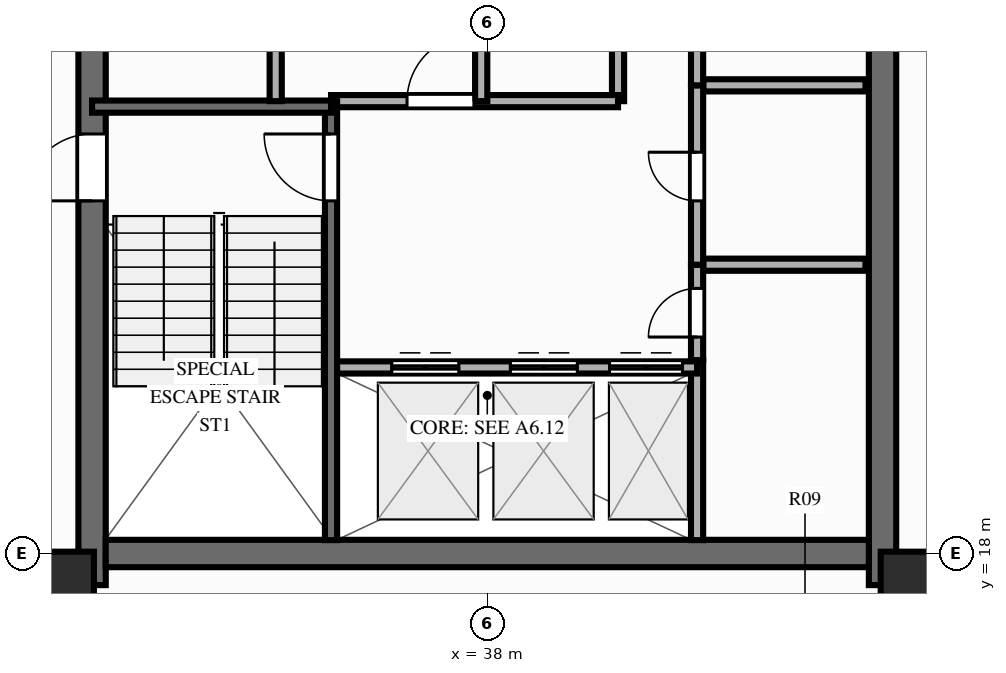
"""IFC4 building model, lengths in metres.
Left out: names, types, materials, properties, quantities, classifications, styles, units other than length and angle.
Written with IfcOpenShell. Run it as: python <this file> out.ifc"""

import sys

from ifc_helpers import new_model, si_unit, direction, frame, frame_2d, origin, origin_2d, place, context, subcontext, project, spatial, rectangle, extrude, source, transform, mapped, element, fill, save


model = new_model("IFC4")
c1 = context("Model", 3, precision=1e-05, world=origin(), true_north=direction((0.0, 1.0)))
c2 = subcontext(c1, "Body", "Model", "MODEL_VIEW")
j1 = project(units=[si_unit("LENGTHUNIT", "METRE"), si_unit("PLANEANGLEUNIT", "RADIAN")], contexts=[c1])
p1 = place(None, origin())
s1 = spatial("IfcSite", under=j1, at=p1, CompositionType="ELEMENT")
p2 = place(p1, origin())
s2 = spatial("IfcBuilding", under=s1, at=p2, CompositionType="ELEMENT")
p3 = place(p2, frame((0.0, 0.0, 172.9)))
s3 = spatial("IfcBuildingStorey", under=s2, at=p3, CompositionType="ELEMENT", Elevation=172.9)
p4 = place(p3, frame((31.5, 17.48, 0.0), z_axis=(0.0, 0.0, 1.0), x_axis=(0.0, 1.0, 0.0)))
e1 = element("IfcWall", 1, at=p4, inside=s3, PredefinedType="SHEAR", context=c2, shape_type="SweptSolid", body=[
    extrude(rectangle(XDim=19.04, YDim=0.45, at=frame_2d((9.52, 0.0))), origin(), (0.0, 0.0, 1.0), 3.9),
])
p5 = place(p4, frame((6.32, 0.0, 0.0)))
e2 = element("IfcOpeningElement", 2, at=p5, cuts=e1, PredefinedType="OPENING", context=c2, shape_type="SweptSolid", body=[
    extrude(rectangle(XDim=1.1, YDim=2.15, at=frame_2d((0.55, 1.075))), frame((0.0, 0.237, 0.0), z_axis=(0.0, -1.0, 0.0), x_axis=(1.0, 0.0, 0.0)), (0.0, 0.0, 1.0), 0.474),
])
p6 = place(p3, frame((44.5, 17.48, 0.0), z_axis=(0.0, 0.0, 1.0), x_axis=(0.0, 1.0, 0.0)))
e3 = element("IfcWall", 3, at=p6, inside=s3, PredefinedType="SHEAR", context=c2, shape_type="SweptSolid", body=[
    extrude(rectangle(XDim=19.04, YDim=0.45, at=frame_2d((9.52, 0.0))), origin(), (0.0, 0.0, 1.0), 3.9),
])
p7 = place(p6, frame((12.67, 0.0, 0.0), z_axis=(0.0, 0.0, 1.0), x_axis=(-1.0, 0.0, 0.0)))
e4 = element("IfcOpeningElement", 4, at=p7, cuts=e3, PredefinedType="OPENING", context=c2, shape_type="SweptSolid", body=[
    extrude(rectangle(XDim=1.1, YDim=2.15, at=frame_2d((0.55, 1.075))), frame((0.0, 0.237, 0.0), z_axis=(0.0, -1.0, 0.0), x_axis=(1.0, 0.0, 0.0)), (0.0, 0.0, 1.0), 0.474),
])
p8 = place(p3, frame((31.725, 18.0, 0.0), z_axis=(0.0, 0.0, 1.0), x_axis=(1.0, 0.0, 0.0)))
e5 = element("IfcWall", 5, at=p8, inside=s3, PredefinedType="SHEAR", context=c2, shape_type="SweptSolid", body=[
    extrude(rectangle(XDim=12.55, YDim=0.45, at=frame_2d((6.275, 0.0))), origin(), (0.0, 0.0, 1.0), 3.9),
])
m1 = source(origin(), c2, "Body", "SweptSolid", [
    extrude(rectangle(XDim=1.1, YDim=1.1, at=origin_2d()), origin(), (0.0, 0.0, 1.0), 3.9),
])
for number, where, z_axis, x_axis in (
    (6, (30.98, 17.48, 0.0), (0.0, 0.0, 1.0), (1.0, 0.0, 0.0)),
    (7, (45.02, 17.48, 0.0), (0.0, 0.0, 1.0), (1.0, 0.0, 0.0)),
):
    element("IfcColumn", number, at=place(p3, frame(where, z_axis=z_axis, x_axis=x_axis)), inside=s3, PredefinedType="COLUMN", context=c2, shape_type="MappedRepresentation", body=[
        mapped(m1, transform((0.0, 0.0, 0.0), scale=1.0)),
    ])
p9 = place(p3, frame((41.55, 22.75, 0.0), z_axis=(0.0, 0.0, 1.0), x_axis=(1.0, 0.0, 0.0)))
e8 = element("IfcWall", 8, at=p9, inside=s3, PredefinedType="PARTITIONING", context=c2, shape_type="SweptSolid", body=[
    extrude(rectangle(XDim=2.67, YDim=0.2, at=frame_2d((1.335, 0.0))), origin(), (0.0, 0.0, 1.0), 3.69),
])
p10 = place(p3, frame((41.55, 25.7, 0.0), z_axis=(0.0, 0.0, 1.0), x_axis=(1.0, 0.0, 0.0)))
e9 = element("IfcWall", 9, at=p10, inside=s3, PredefinedType="PARTITIONING", context=c2, shape_type="SweptSolid", body=[
    extrude(rectangle(XDim=2.67, YDim=0.2, at=frame_2d((1.335, 0.0))), origin(), (0.0, 0.0, 1.0), 3.04),
])
p11 = place(p3, frame((41.45, 18.22, 0.0), z_axis=(0.0, 0.0, 1.0), x_axis=(0.0, 1.0, 0.0)))
e10 = element("IfcWall", 10, at=p11, inside=s3, PredefinedType="PARTITIONING", context=c2, shape_type="SweptSolid", body=[
    extrude(rectangle(XDim=2.96, YDim=0.2, at=frame_2d((1.48, 0.0))), origin(), (0.0, 0.0, 1.0), 3.69),
])
p12 = place(p3, frame((41.45, 21.18, 0.0), z_axis=(0.0, 0.0, 1.0), x_axis=(0.0, 1.0, 0.0)))
e11 = element("IfcWall", 11, at=p12, inside=s3, PredefinedType="PARTITIONING", context=c2, shape_type="SweptSolid", body=[
    extrude(rectangle(XDim=1.57, YDim=0.2, at=frame_2d((0.785, 0.0))), origin(), (0.0, 0.0, 1.0), 3.69),
])
p13 = place(p12, frame((0.38, 0.0, 0.0)))
e12 = element("IfcOpeningElement", 12, at=p13, cuts=e11, PredefinedType="OPENING", context=c2, shape_type="SweptSolid", body=[
    extrude(rectangle(XDim=0.8, YDim=2.05, at=frame_2d((0.4, 1.025))), frame((0.0, 0.112, 0.0), z_axis=(0.0, -1.0, 0.0), x_axis=(1.0, 0.0, 0.0)), (0.0, 0.0, 1.0), 0.224),
])
p14 = place(p3, frame((41.45, 22.75, 0.0), z_axis=(0.0, 0.0, 1.0), x_axis=(0.0, 1.0, 0.0)))
e13 = element("IfcWall", 13, at=p14, inside=s3, PredefinedType="PARTITIONING", context=c2, shape_type="SweptSolid", body=[
    extrude(rectangle(XDim=2.95, YDim=0.2, at=frame_2d((1.475, 0.0))), origin(), (0.0, 0.0, 1.0), 3.69),
])
p15 = place(p14, frame((1.05, 0.0, 0.0)))
e14 = element("IfcOpeningElement", 14, at=p15, cuts=e13, PredefinedType="OPENING", context=c2, shape_type="SweptSolid", body=[
    extrude(rectangle(XDim=0.8, YDim=2.05, at=frame_2d((0.4, 1.025))), frame((0.0, 0.112, 0.0), z_axis=(0.0, -1.0, 0.0), x_axis=(1.0, 0.0, 0.0)), (0.0, 0.0, 1.0), 0.224),
])
p16 = place(p3, frame((41.45, 25.7, 0.0), z_axis=(0.0, 0.0, 1.0), x_axis=(0.0, 1.0, 0.0)))
e15 = element("IfcWall", 15, at=p16, inside=s3, PredefinedType="PARTITIONING", context=c2, shape_type="SweptSolid", body=[
    extrude(rectangle(XDim=2.9, YDim=0.2, at=frame_2d((1.45, 0.0))), origin(), (0.0, 0.0, 1.0), 3.69),
])
p17 = place(p16, frame((1.0, 0.0, 0.0)))
e16 = element("IfcOpeningElement", 16, at=p17, cuts=e15, PredefinedType="OPENING", context=c2, shape_type="SweptSolid", body=[
    extrude(rectangle(XDim=0.9, YDim=2.1, at=frame_2d((0.45, 1.05))), frame((0.0, 0.112, 0.0), z_axis=(0.0, -1.0, 0.0), x_axis=(1.0, 0.0, 0.0)), (0.0, 0.0, 1.0), 0.224),
])
p18 = place(p3, frame((40.15, 25.44, 0.0), z_axis=(0.0, 0.0, 1.0), x_axis=(0.0, 1.0, 0.0)))
e17 = element("IfcWall", 17, at=p18, inside=s3, PredefinedType="PARTITIONING", context=c2, shape_type="SweptSolid", body=[
    extrude(rectangle(XDim=6.36, YDim=0.2, at=frame_2d((3.18, 0.0))), origin(), (0.0, 0.0, 1.0), 3.69),
])
p19 = place(p3, frame((35.43, 21.06, 0.0), z_axis=(0.0, 0.0, 1.0), x_axis=(1.0, 0.0, 0.0)))
e18 = element("IfcWall", 18, at=p19, inside=s3, PredefinedType="PARTITIONING", context=c2, shape_type="SweptSolid", body=[
    extrude(rectangle(XDim=6.02, YDim=0.2, at=frame_2d((3.01, 0.0))), origin(), (0.0, 0.0, 1.0), 3.69),
])
p20 = place(p19, frame((1.0, 0.0, 0.0)))
e19 = element("IfcOpeningElement", 19, at=p20, cuts=e18, PredefinedType="OPENING", context=c2, shape_type="SweptSolid", body=[
    extrude(rectangle(XDim=1.1, YDim=2.15, at=frame_2d((0.55, 1.075))), frame((0.0, 0.112, 0.0), z_axis=(0.0, -1.0, 0.0), x_axis=(1.0, 0.0, 0.0)), (0.0, 0.0, 1.0), 0.224),
])
p21 = place(p19, frame((2.95, 0.0, 0.0)))
e20 = element("IfcOpeningElement", 20, at=p21, cuts=e18, PredefinedType="OPENING", context=c2, shape_type="SweptSolid", body=[
    extrude(rectangle(XDim=1.1, YDim=2.15, at=frame_2d((0.55, 1.075))), frame((0.0, 0.112, 0.0), z_axis=(0.0, -1.0, 0.0), x_axis=(1.0, 0.0, 0.0)), (0.0, 0.0, 1.0), 0.224),
])
p22 = place(p19, frame((4.58, 0.0, 0.0)))
e21 = element("IfcOpeningElement", 21, at=p22, cuts=e18, PredefinedType="OPENING", context=c2, shape_type="SweptSolid", body=[
    extrude(rectangle(XDim=1.2, YDim=2.15, at=frame_2d((0.6, 1.075))), frame((0.0, 0.112, 0.0), z_axis=(0.0, -1.0, 0.0), x_axis=(1.0, 0.0, 0.0)), (0.0, 0.0, 1.0), 0.224),
])
p23 = place(p3, frame((35.43, 25.44, 0.0), z_axis=(0.0, 0.0, 1.0), x_axis=(1.0, 0.0, 0.0)))
e22 = element("IfcWall", 22, at=p23, inside=s3, PredefinedType="PARTITIONING", context=c2, shape_type="SweptSolid", body=[
    extrude(rectangle(XDim=4.72, YDim=0.2, at=frame_2d((2.36, 0.0))), origin(), (0.0, 0.0, 1.0), 3.69),
])
p24 = place(p23, frame((1.25, 0.0, 0.0)))
e23 = element("IfcOpeningElement", 23, at=p24, cuts=e22, PredefinedType="OPENING", context=c2, shape_type="SweptSolid", body=[
    extrude(rectangle(XDim=1.1, YDim=2.15, at=frame_2d((0.55, 1.075))), frame((0.0, 0.112, 0.0), z_axis=(0.0, -1.0, 0.0), x_axis=(1.0, 0.0, 0.0)), (0.0, 0.0, 1.0), 0.224),
])
p25 = place(p3, frame((35.43, 18.22, 0.0), z_axis=(0.0, 0.0, 1.0), x_axis=(0.0, 1.0, 0.0)))
e24 = element("IfcWall", 24, at=p25, inside=s3, PredefinedType="SOLIDWALL", context=c2, shape_type="SweptSolid", body=[
    extrude(rectangle(XDim=7.22, YDim=0.2, at=frame_2d((3.61, 0.0))), origin(), (0.0, 0.0, 1.0), 3.69),
])
p26 = place(p25, frame((6.68, 0.0, 0.0), z_axis=(0.0, 0.0, 1.0), x_axis=(-1.0, 0.0, 0.0)))
e25 = element("IfcOpeningElement", 25, at=p26, cuts=e24, PredefinedType="OPENING", context=c2, shape_type="SweptSolid", body=[
    extrude(rectangle(XDim=1.1, YDim=2.15, at=frame_2d((0.55, 1.075))), frame((0.0, 0.112, 0.0), z_axis=(0.0, -1.0, 0.0), x_axis=(1.0, 0.0, 0.0)), (0.0, 0.0, 1.0), 0.224),
])
p27 = place(p3, frame((31.5, 25.35, 0.0), z_axis=(0.0, 0.0, 1.0), x_axis=(1.0, 0.0, 0.0)))
e26 = element("IfcWall", 26, at=p27, inside=s3, PredefinedType="SOLIDWALL", context=c2, shape_type="SweptSolid", body=[
    extrude(rectangle(XDim=3.93, YDim=0.2, at=frame_2d((1.965, 0.0))), origin(), (0.0, 0.0, 1.0), 3.69),
])
p28 = place(p3, frame((34.52, 25.44, 0.0), z_axis=(0.0, 0.0, 1.0), x_axis=(0.0, 1.0, 0.0)))
e27 = element("IfcWall", 27, at=p28, inside=s3, PredefinedType="PARTITIONING", context=c2, shape_type="SweptSolid", body=[
    extrude(rectangle(XDim=10.34, YDim=0.2, at=frame_2d((5.17, 0.0))), origin(), (0.0, 0.0, 1.0), 3.69),
])
p29 = place(p28, frame((1.15, 0.0, 0.0)))
e28 = element("IfcOpeningElement", 28, at=p29, cuts=e27, PredefinedType="OPENING", context=c2, shape_type="SweptSolid", body=[
    extrude(rectangle(XDim=0.9, YDim=2.1, at=frame_2d((0.45, 1.05))), frame((0.0, 0.112, 0.0), z_axis=(0.0, -1.0, 0.0), x_axis=(1.0, 0.0, 0.0)), (0.0, 0.0, 1.0), 0.224),
])
p30 = place(p28, frame((4.35, 0.0, 0.0)))
e29 = element("IfcOpeningElement", 29, at=p30, cuts=e27, PredefinedType="OPENING", context=c2, shape_type="SweptSolid", body=[
    extrude(rectangle(XDim=0.9, YDim=2.1, at=frame_2d((0.45, 1.05))), frame((0.0, 0.112, 0.0), z_axis=(0.0, -1.0, 0.0), x_axis=(1.0, 0.0, 0.0)), (0.0, 0.0, 1.0), 0.224),
])
p31 = place(p28, frame((7.01, 0.0, 0.0)))
e30 = element("IfcOpeningElement", 30, at=p31, cuts=e27, PredefinedType="OPENING", context=c2, shape_type="SweptSolid", body=[
    extrude(rectangle(XDim=1.0, YDim=2.15, at=frame_2d((0.5, 1.075))), frame((0.0, 0.112, 0.0), z_axis=(0.0, -1.0, 0.0), x_axis=(1.0, 0.0, 0.0)), (0.0, 0.0, 1.0), 0.224),
])
p32 = place(p28, frame((8.76, 0.0, 0.0)))
e31 = element("IfcOpeningElement", 31, at=p32, cuts=e27, PredefinedType="OPENING", context=c2, shape_type="SweptSolid", body=[
    extrude(rectangle(XDim=1.0, YDim=2.15, at=frame_2d((0.5, 1.075))), frame((0.0, 0.112, 0.0), z_axis=(0.0, -1.0, 0.0), x_axis=(1.0, 0.0, 0.0)), (0.0, 0.0, 1.0), 0.224),
])
p33 = place(p3, frame((37.9, 25.44, 0.0), z_axis=(0.0, 0.0, 1.0), x_axis=(0.0, 1.0, 0.0)))
e32 = element("IfcWall", 32, at=p33, inside=s3, PredefinedType="PARTITIONING", context=c2, shape_type="SweptSolid", body=[
    extrude(rectangle(XDim=10.34, YDim=0.2, at=frame_2d((5.17, 0.0))), origin(), (0.0, 0.0, 1.0), 3.69),
])
p34 = place(p33, frame((2.6, 0.0, 0.0)))
e33 = element("IfcOpeningElement", 33, at=p34, cuts=e32, PredefinedType="OPENING", context=c2, shape_type="SweptSolid", body=[
    extrude(rectangle(XDim=1.0, YDim=2.15, at=frame_2d((0.5, 1.075))), frame((0.0, 0.112, 0.0), z_axis=(0.0, -1.0, 0.0), x_axis=(1.0, 0.0, 0.0)), (0.0, 0.0, 1.0), 0.224),
])
p35 = place(p33, frame((6.86, 0.0, 0.0)))
e34 = element("IfcOpeningElement", 34, at=p35, cuts=e32, PredefinedType="OPENING", context=c2, shape_type="SweptSolid", body=[
    extrude(rectangle(XDim=1.0, YDim=2.15, at=frame_2d((0.5, 1.075))), frame((0.0, 0.112, 0.0), z_axis=(0.0, -1.0, 0.0), x_axis=(1.0, 0.0, 0.0)), (0.0, 0.0, 1.0), 0.224),
])
p36 = place(p33, frame((8.71, 0.0, 0.0)))
e35 = element("IfcOpeningElement", 35, at=p36, cuts=e32, PredefinedType="OPENING", context=c2, shape_type="SweptSolid", body=[
    extrude(rectangle(XDim=1.0, YDim=2.15, at=frame_2d((0.5, 1.075))), frame((0.0, 0.112, 0.0), z_axis=(0.0, -1.0, 0.0), x_axis=(1.0, 0.0, 0.0)), (0.0, 0.0, 1.0), 0.224),
])
m2 = source(origin(), c2, "Body", "SweptSolid", [
    extrude(rectangle(XDim=1.1, YDim=2.15, at=frame_2d((0.55, 1.075))), frame((0.0, 0.025, 0.0), z_axis=(0.0, -1.0, 0.0), x_axis=(1.0, 0.0, 0.0)), (0.0, 0.0, 1.0), 0.05),
])
p37 = place(p5, origin())
e36 = element("IfcDoor", 36, at=p37, inside=s3, OperationType="SINGLE_SWING_LEFT", PredefinedType="DOOR", context=c2, shape_type="MappedRepresentation", body=[
    mapped(m2, transform((0.0, 0.0, 0.0), scale=1.0)),
])
fill(e2, e36)
m3 = source(origin(), c2, "Body", "SweptSolid", [
    extrude(rectangle(XDim=0.8, YDim=2.05, at=frame_2d((0.4, 1.025))), frame((0.0, 0.025, 0.0), z_axis=(0.0, -1.0, 0.0), x_axis=(1.0, 0.0, 0.0)), (0.0, 0.0, 1.0), 0.05),
])
p38 = place(p13, origin())
e37 = element("IfcDoor", 37, at=p38, inside=s3, OperationType="SINGLE_SWING_LEFT", PredefinedType="DOOR", context=c2, shape_type="MappedRepresentation", body=[
    mapped(m3, transform((0.0, 0.0, 0.0), scale=1.0)),
])
fill(e12, e37)
p39 = place(p15, origin())
e38 = element("IfcDoor", 38, at=p39, inside=s3, OperationType="SINGLE_SWING_RIGHT", PredefinedType="DOOR", context=c2, shape_type="MappedRepresentation", body=[
    mapped(m3, transform((0.0, 0.0, 0.0), scale=1.0)),
])
fill(e14, e38)
p40 = place(p20, origin())
e39 = element("IfcDoor", 39, at=p40, inside=s3, OperationType="DOUBLE_DOOR_SLIDING", PredefinedType="DOOR", context=c2, shape_type="MappedRepresentation", body=[
    mapped(m2, transform((0.0, 0.0, 0.0), scale=1.0)),
])
fill(e19, e39)
p41 = place(p21, origin())
e40 = element("IfcDoor", 40, at=p41, inside=s3, OperationType="DOUBLE_DOOR_SLIDING", PredefinedType="DOOR", context=c2, shape_type="MappedRepresentation", body=[
    mapped(m2, transform((0.0, 0.0, 0.0), scale=1.0)),
])
fill(e20, e40)
m4 = source(origin(), c2, "Body", "SweptSolid", [
    extrude(rectangle(XDim=1.2, YDim=2.15, at=frame_2d((0.6, 1.075))), frame((0.0, 0.025, 0.0), z_axis=(0.0, -1.0, 0.0), x_axis=(1.0, 0.0, 0.0)), (0.0, 0.0, 1.0), 0.05),
])
p42 = place(p22, origin())
e41 = element("IfcDoor", 41, at=p42, inside=s3, OperationType="DOUBLE_DOOR_SLIDING", PredefinedType="DOOR", context=c2, shape_type="MappedRepresentation", body=[
    mapped(m4, transform((0.0, 0.0, 0.0), scale=1.0)),
])
fill(e21, e41)
p43 = place(p24, origin())
e42 = element("IfcDoor", 42, at=p43, inside=s3, OperationType="SINGLE_SWING_RIGHT", PredefinedType="DOOR", context=c2, shape_type="MappedRepresentation", body=[
    mapped(m2, transform((0.0, 0.0, 0.0), scale=1.0)),
])
fill(e23, e42)
p44 = place(p26, origin())
e43 = element("IfcDoor", 43, at=p44, inside=s3, OperationType="SINGLE_SWING_LEFT", PredefinedType="DOOR", context=c2, shape_type="MappedRepresentation", body=[
    mapped(m2, transform((0.0, 0.0, 0.0), scale=1.0)),
])
fill(e25, e43)
save(model, sys.argv[1])
